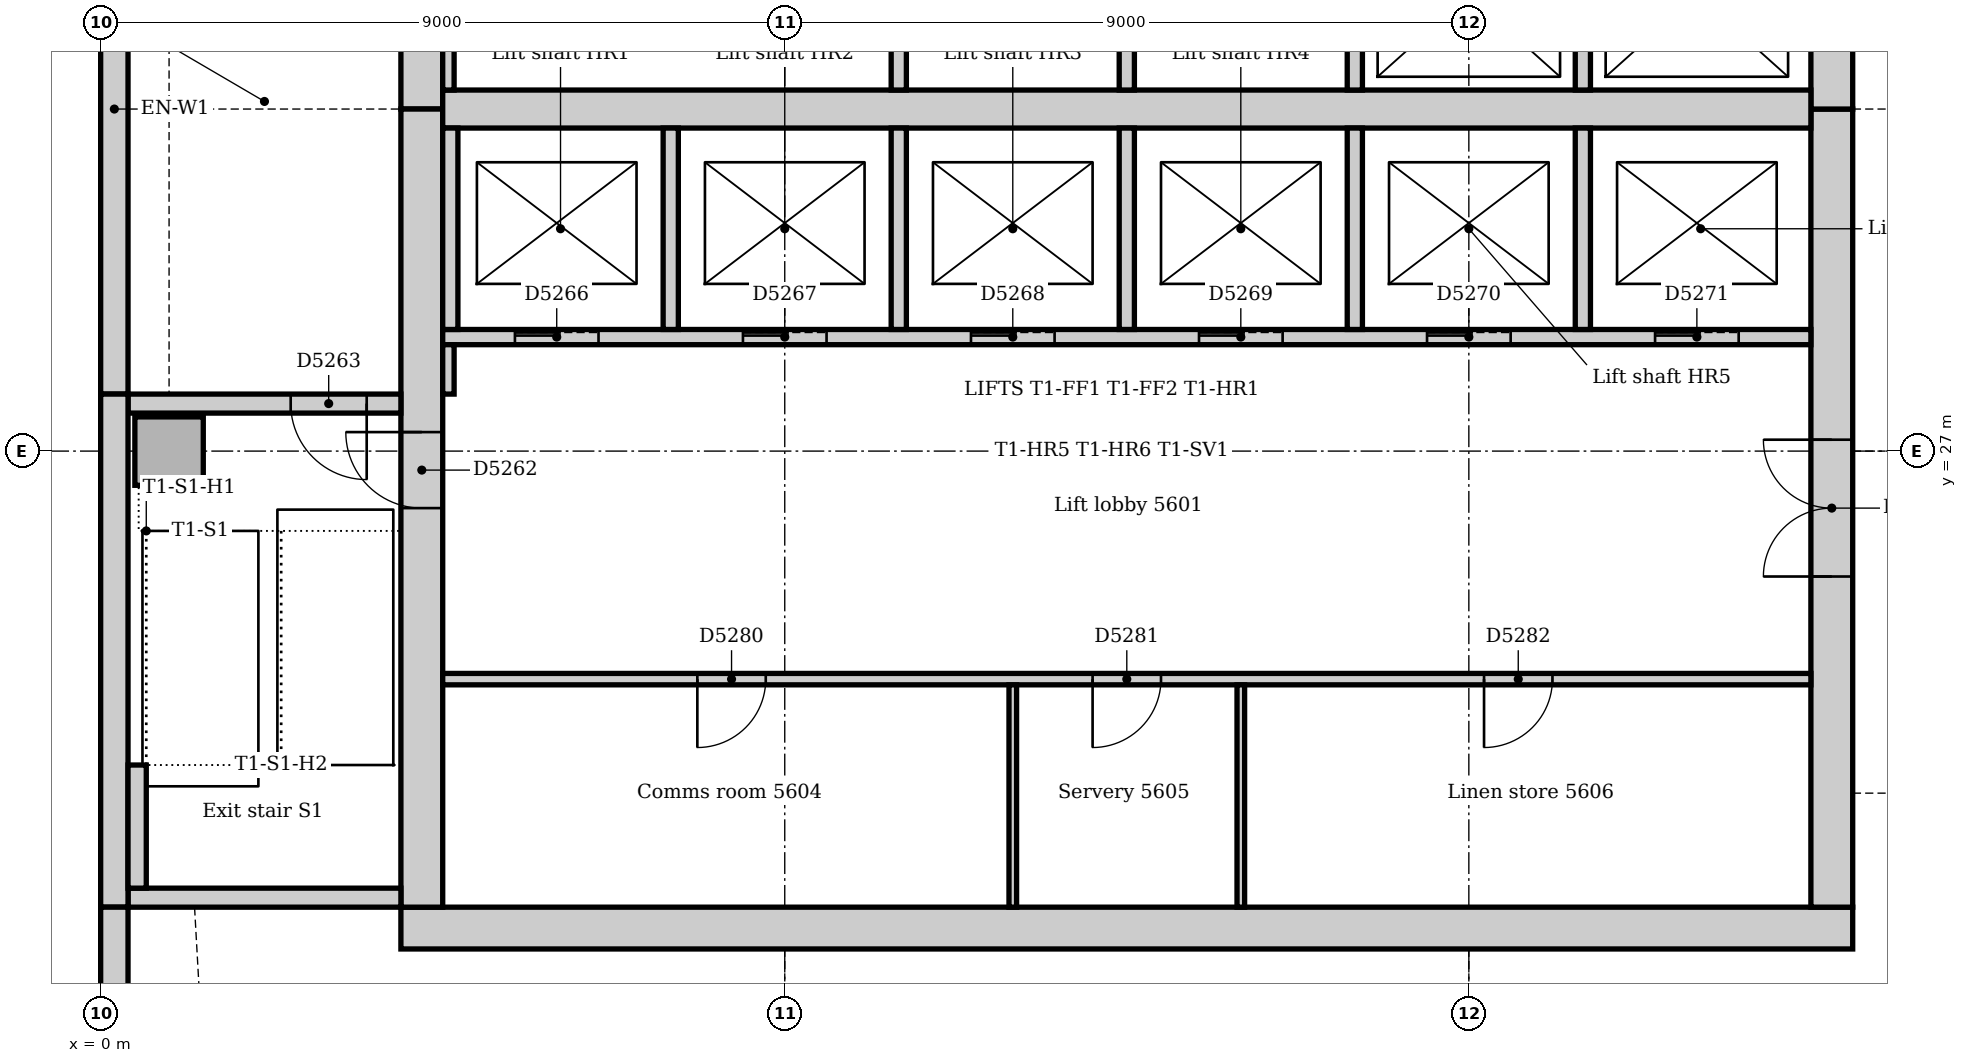
"""IFC4 building model, lengths in metres.
Left out: names, types, materials, properties, quantities, classifications, styles, units other than length and angle.
Written with IfcOpenShell. Run it as: python <this file> out.ifc"""

import sys

from ifc_helpers import new_model, si_unit, direction, frame, frame_2d, origin, origin_2d, place, context, subcontext, project, spatial, rectangle, extrude, element, fill, save


model = new_model("IFC4")
c1 = context("Model", 3, precision=1e-05, world=origin(), true_north=direction((0.0, 1.0)))
c2 = subcontext(c1, "Body", "Model", "MODEL_VIEW")
j1 = project(units=[si_unit("LENGTHUNIT", "METRE"), si_unit("PLANEANGLEUNIT", "RADIAN")], contexts=[c1])
p1 = place(None, origin())
s1 = spatial("IfcSite", under=j1, at=p1, CompositionType="ELEMENT")
p2 = place(p1, origin())
s2 = spatial("IfcBuilding", under=s1, at=p2, CompositionType="ELEMENT")
p3 = place(p2, frame((0.0, 0.0, 234.0)))
s3 = spatial("IfcBuildingStorey", under=s2, at=p3, CompositionType="ELEMENT", Elevation=234.0)
p4 = place(p3, frame((3.95, 20.725, 0.0), z_axis=(0.0, 0.0, 1.0), x_axis=(1.0, 0.0, 0.0)))
e1 = element("IfcWall", 1, at=p4, inside=s3, PredefinedType="SOLIDWALL", context=c2, shape_type="SweptSolid", body=[
    extrude(rectangle(XDim=19.1, YDim=0.55, at=frame_2d((9.55, 0.0))), origin(), (0.0, 0.0, 1.0), 4.0),
])
p5 = place(p3, frame((22.775, 21.0, 0.0), z_axis=(0.0, 0.0, 1.0), x_axis=(0.0, 1.0, 0.0)))
e2 = element("IfcWall", 2, at=p5, inside=s3, PredefinedType="SOLIDWALL", context=c2, shape_type="SweptSolid", body=[
    extrude(rectangle(XDim=10.5, YDim=0.55, at=frame_2d((5.25, 0.0))), origin(), (0.0, 0.0, 1.0), 4.0),
])
p6 = place(p5, frame((4.35, 0.0, 0.0)))
e3 = element("IfcOpeningElement", 3, at=p6, cuts=e2, PredefinedType="OPENING", context=c2, shape_type="SweptSolid", body=[
    extrude(rectangle(XDim=1.8, YDim=2.1, at=frame_2d((0.9, 1.05))), frame((0.0, 0.285, 0.0), z_axis=(0.0, -1.0, 0.0), x_axis=(1.0, 0.0, 0.0)), (0.0, 0.0, 1.0), 0.57),
])
p7 = place(p3, frame((22.775, 31.5, 0.0), z_axis=(0.0, 0.0, 1.0), x_axis=(0.0, 1.0, 0.0)))
e4 = element("IfcWall", 4, at=p7, inside=s3, PredefinedType="SOLIDWALL", context=c2, shape_type="SweptSolid", body=[
    extrude(rectangle(XDim=10.5, YDim=0.55, at=frame_2d((5.25, 0.0))), origin(), (0.0, 0.0, 1.0), 4.0),
])
p8 = place(p7, frame((3.15, 0.0, 0.0)))
e5 = element("IfcOpeningElement", 5, at=p8, cuts=e4, PredefinedType="OPENING", context=c2, shape_type="SweptSolid", body=[
    extrude(rectangle(XDim=1.0, YDim=2.1, at=frame_2d((0.5, 1.05))), frame((0.0, 0.285, 0.0), z_axis=(0.0, -1.0, 0.0), x_axis=(1.0, 0.0, 0.0)), (0.0, 0.0, 1.0), 0.57),
])
p9 = place(p7, frame((5.2, 0.0, 0.0)))
e6 = element("IfcOpeningElement", 6, at=p9, cuts=e4, PredefinedType="OPENING", context=c2, shape_type="SweptSolid", body=[
    extrude(rectangle(XDim=1.0, YDim=2.1, at=frame_2d((0.5, 1.05))), frame((0.0, 0.285, 0.0), z_axis=(0.0, -1.0, 0.0), x_axis=(1.0, 0.0, 0.0)), (0.0, 0.0, 1.0), 0.57),
])
p10 = place(p3, frame((4.225, 42.0, 0.0), z_axis=(0.0, 0.0, 1.0), x_axis=(0.0, -1.0, 0.0)))
e7 = element("IfcWall", 7, at=p10, inside=s3, PredefinedType="SOLIDWALL", context=c2, shape_type="SweptSolid", body=[
    extrude(rectangle(XDim=10.5, YDim=0.55, at=frame_2d((5.25, 0.0))), origin(), (0.0, 0.0, 1.0), 4.0),
])
p11 = place(p10, frame((5.3, 0.0, 0.0)))
e8 = element("IfcOpeningElement", 8, at=p11, cuts=e7, PredefinedType="OPENING", context=c2, shape_type="SweptSolid", body=[
    extrude(rectangle(XDim=1.0, YDim=2.1, at=frame_2d((0.5, 1.05))), frame((0.0, 0.285, 0.0), z_axis=(0.0, -1.0, 0.0), x_axis=(1.0, 0.0, 0.0)), (0.0, 0.0, 1.0), 0.57),
])
p12 = place(p3, frame((4.225, 31.5, 0.0), z_axis=(0.0, 0.0, 1.0), x_axis=(0.0, -1.0, 0.0)))
e9 = element("IfcWall", 9, at=p12, inside=s3, PredefinedType="SOLIDWALL", context=c2, shape_type="SweptSolid", body=[
    extrude(rectangle(XDim=10.5, YDim=0.55, at=frame_2d((5.25, 0.0))), origin(), (0.0, 0.0, 1.0), 4.0),
])
p13 = place(p12, frame((4.25, 0.0, 0.0)))
e10 = element("IfcOpeningElement", 10, at=p13, cuts=e9, PredefinedType="OPENING", context=c2, shape_type="SweptSolid", body=[
    extrude(rectangle(XDim=1.0, YDim=2.1, at=frame_2d((0.5, 1.05))), frame((0.0, 0.285, 0.0), z_axis=(0.0, -1.0, 0.0), x_axis=(1.0, 0.0, 0.0)), (0.0, 0.0, 1.0), 0.57),
])
p14 = place(p3, frame((4.5, 31.5, 0.0), z_axis=(0.0, 0.0, 1.0), x_axis=(1.0, 0.0, 0.0)))
e11 = element("IfcWall", 11, at=p14, inside=s3, PredefinedType="SOLIDWALL", context=c2, shape_type="SweptSolid", body=[
    extrude(rectangle(XDim=18.0, YDim=0.5, at=frame_2d((9.0, 0.0))), origin(), (0.0, 0.0, 1.0), 4.0),
])
p15 = place(p3, frame((0.36, 21.125, 0.0), z_axis=(0.0, 0.0, 1.0), x_axis=(1.0, 0.0, 0.0)))
e12 = element("IfcWall", 12, at=p15, inside=s3, PredefinedType="SOLIDWALL", context=c2, shape_type="SweptSolid", body=[
    extrude(rectangle(XDim=3.59, YDim=0.25, at=frame_2d((1.795, 0.0))), origin(), (0.0, 0.0, 1.0), 4.0),
])
p16 = place(p3, frame((3.95, 27.625, 0.0), z_axis=(0.0, 0.0, 1.0), x_axis=(-1.0, 0.0, 0.0)))
e13 = element("IfcWall", 13, at=p16, inside=s3, PredefinedType="SOLIDWALL", context=c2, shape_type="SweptSolid", body=[
    extrude(rectangle(XDim=3.59, YDim=0.25, at=frame_2d((1.795, 0.0))), origin(), (0.0, 0.0, 1.0), 4.0),
])
p17 = place(p16, frame((0.45, 0.0, 0.0)))
e14 = element("IfcOpeningElement", 14, at=p17, cuts=e13, PredefinedType="OPENING", context=c2, shape_type="SweptSolid", body=[
    extrude(rectangle(XDim=1.0, YDim=2.1, at=frame_2d((0.5, 1.05))), frame((0.0, 0.135, 0.0), z_axis=(0.0, -1.0, 0.0), x_axis=(1.0, 0.0, 0.0)), (0.0, 0.0, 1.0), 0.27),
])
p18 = place(p3, frame((0.9, 27.0, 0.0), z_axis=(0.0, 0.0, 1.0), x_axis=(1.0, 0.0, 0.0)))
e15 = element("IfcColumn", 15, at=p18, inside=s3, PredefinedType="COLUMN", context=c2, shape_type="SweptSolid", body=[
    extrude(rectangle(XDim=0.9, YDim=0.9, at=origin_2d()), origin(), (0.0, 0.0, 1.0), 4.0),
])
p19 = place(p3, frame((0.18, 35.25, 0.0), z_axis=(0.0, 0.0, 1.0), x_axis=(0.0, -1.0, 0.0)))
e16 = element("IfcWall", 16, at=p19, inside=s3, PredefinedType="STANDARD", context=c2, shape_type="SweptSolid", body=[
    extrude(rectangle(XDim=7.5, YDim=0.36, at=frame_2d((3.75, 0.0))), origin(), (0.0, 0.0, 1.0), 3.85),
])
p20 = place(p3, frame((0.18, 27.75, 0.0), z_axis=(0.0, 0.0, 1.0), x_axis=(0.0, -1.0, 0.0)))
e17 = element("IfcWall", 17, at=p20, inside=s3, PredefinedType="STANDARD", context=c2, shape_type="SweptSolid", body=[
    extrude(rectangle(XDim=6.75, YDim=0.36, at=frame_2d((3.375, 0.0))), origin(), (0.0, 0.0, 1.0), 3.85),
])
p21 = place(p3, frame((0.18, 21.0, 0.0), z_axis=(0.0, 0.0, 1.0), x_axis=(0.0, -1.0, 0.0)))
e18 = element("IfcWall", 18, at=p21, inside=s3, PredefinedType="STANDARD", context=c2, shape_type="SweptSolid", body=[
    extrude(rectangle(XDim=3.257, YDim=0.36, at=frame_2d((1.629, 0.0))), origin(), (0.0, 0.0, 1.0), 3.85),
])
p22 = place(p3, frame((0.48, 21.25, 0.0), z_axis=(0.0, 0.0, 1.0), x_axis=(0.0, 1.0, 0.0)))
e19 = element("IfcWall", 19, at=p22, inside=s3, PredefinedType="STANDARD", context=c2, shape_type="SweptSolid", body=[
    extrude(rectangle(XDim=1.62, YDim=0.24, at=frame_2d((0.81, 0.0))), origin(), (0.0, 0.0, 1.0), 4.0),
])
p23 = place(p3, frame((4.5, 28.5, 0.0), z_axis=(0.0, 0.0, 1.0), x_axis=(1.0, 0.0, 0.0)))
e20 = element("IfcWall", 20, at=p23, inside=s3, PredefinedType="PARTITIONING", context=c2, shape_type="SweptSolid", body=[
    extrude(rectangle(XDim=18.0, YDim=0.2, at=frame_2d((9.0, 0.0))), origin(), (0.0, 0.0, 1.0), 3.85),
])
p24 = place(p23, frame((0.95, 0.0, 0.0)))
e21 = element("IfcOpeningElement", 21, at=p24, cuts=e20, PredefinedType="OPENING", context=c2, shape_type="SweptSolid", body=[
    extrude(rectangle(XDim=1.1, YDim=2.1, at=frame_2d((0.55, 1.05))), frame((0.0, 0.11, 0.0), z_axis=(0.0, -1.0, 0.0), x_axis=(1.0, 0.0, 0.0)), (0.0, 0.0, 1.0), 0.22),
])
p25 = place(p23, frame((3.95, 0.0, 0.0)))
e22 = element("IfcOpeningElement", 22, at=p25, cuts=e20, PredefinedType="OPENING", context=c2, shape_type="SweptSolid", body=[
    extrude(rectangle(XDim=1.1, YDim=2.1, at=frame_2d((0.55, 1.05))), frame((0.0, 0.11, 0.0), z_axis=(0.0, -1.0, 0.0), x_axis=(1.0, 0.0, 0.0)), (0.0, 0.0, 1.0), 0.22),
])
p26 = place(p23, frame((6.95, 0.0, 0.0)))
e23 = element("IfcOpeningElement", 23, at=p26, cuts=e20, PredefinedType="OPENING", context=c2, shape_type="SweptSolid", body=[
    extrude(rectangle(XDim=1.1, YDim=2.1, at=frame_2d((0.55, 1.05))), frame((0.0, 0.11, 0.0), z_axis=(0.0, -1.0, 0.0), x_axis=(1.0, 0.0, 0.0)), (0.0, 0.0, 1.0), 0.22),
])
p27 = place(p23, frame((9.95, 0.0, 0.0)))
e24 = element("IfcOpeningElement", 24, at=p27, cuts=e20, PredefinedType="OPENING", context=c2, shape_type="SweptSolid", body=[
    extrude(rectangle(XDim=1.1, YDim=2.1, at=frame_2d((0.55, 1.05))), frame((0.0, 0.11, 0.0), z_axis=(0.0, -1.0, 0.0), x_axis=(1.0, 0.0, 0.0)), (0.0, 0.0, 1.0), 0.22),
])
p28 = place(p23, frame((12.95, 0.0, 0.0)))
e25 = element("IfcOpeningElement", 25, at=p28, cuts=e20, PredefinedType="OPENING", context=c2, shape_type="SweptSolid", body=[
    extrude(rectangle(XDim=1.1, YDim=2.1, at=frame_2d((0.55, 1.05))), frame((0.0, 0.11, 0.0), z_axis=(0.0, -1.0, 0.0), x_axis=(1.0, 0.0, 0.0)), (0.0, 0.0, 1.0), 0.22),
])
p29 = place(p23, frame((15.95, 0.0, 0.0)))
e26 = element("IfcOpeningElement", 26, at=p29, cuts=e20, PredefinedType="OPENING", context=c2, shape_type="SweptSolid", body=[
    extrude(rectangle(XDim=1.1, YDim=2.1, at=frame_2d((0.55, 1.05))), frame((0.0, 0.11, 0.0), z_axis=(0.0, -1.0, 0.0), x_axis=(1.0, 0.0, 0.0)), (0.0, 0.0, 1.0), 0.22),
])
for number, where, z_axis, x_axis in (
    (27, (10.5, 28.6, 0.0), (0.0, 0.0, 1.0), (0.0, 1.0, 0.0)),
    (28, (10.5, 31.75, 0.0), (0.0, 0.0, 1.0), (0.0, 1.0, 0.0)),
    (29, (13.5, 28.6, 0.0), (0.0, 0.0, 1.0), (0.0, 1.0, 0.0)),
    (30, (13.5, 31.75, 0.0), (0.0, 0.0, 1.0), (0.0, 1.0, 0.0)),
    (31, (16.5, 28.6, 0.0), (0.0, 0.0, 1.0), (0.0, 1.0, 0.0)),
    (32, (16.5, 31.75, 0.0), (0.0, 0.0, 1.0), (0.0, 1.0, 0.0)),
    (33, (19.5, 28.6, 0.0), (0.0, 0.0, 1.0), (0.0, 1.0, 0.0)),
    (34, (19.5, 31.75, 0.0), (0.0, 0.0, 1.0), (0.0, 1.0, 0.0)),
    (35, (4.6, 28.6, 0.0), (0.0, 0.0, 1.0), (0.0, 1.0, 0.0)),
    (36, (7.5, 28.6, 0.0), (0.0, 0.0, 1.0), (0.0, 1.0, 0.0)),
):
    element("IfcWall", number, at=place(p3, frame(where, z_axis=z_axis, x_axis=x_axis)), inside=s3, PredefinedType="PARTITIONING", context=c2, shape_type="SweptSolid", body=[
        extrude(rectangle(XDim=2.65, YDim=0.2, at=frame_2d((1.325, 0.0))), origin(), (0.0, 0.0, 1.0), 3.85),
    ])
p30 = place(p3, frame((4.5, 24.0, 0.0), z_axis=(0.0, 0.0, 1.0), x_axis=(1.0, 0.0, 0.0)))
e37 = element("IfcWall", 37, at=p30, inside=s3, PredefinedType="PARTITIONING", context=c2, shape_type="SweptSolid", body=[
    extrude(rectangle(XDim=18.0, YDim=0.15, at=frame_2d((9.0, 0.0))), origin(), (0.0, 0.0, 1.0), 3.85),
])
p31 = place(p30, frame((3.35, 0.0, 0.0)))
e38 = element("IfcOpeningElement", 38, at=p31, cuts=e37, PredefinedType="OPENING", context=c2, shape_type="SweptSolid", body=[
    extrude(rectangle(XDim=0.9, YDim=2.1, at=frame_2d((0.45, 1.05))), frame((0.0, 0.085, 0.0), z_axis=(0.0, -1.0, 0.0), x_axis=(1.0, 0.0, 0.0)), (0.0, 0.0, 1.0), 0.17),
])
p32 = place(p30, frame((8.55, 0.0, 0.0)))
e39 = element("IfcOpeningElement", 39, at=p32, cuts=e37, PredefinedType="OPENING", context=c2, shape_type="SweptSolid", body=[
    extrude(rectangle(XDim=0.9, YDim=2.1, at=frame_2d((0.45, 1.05))), frame((0.0, 0.085, 0.0), z_axis=(0.0, -1.0, 0.0), x_axis=(1.0, 0.0, 0.0)), (0.0, 0.0, 1.0), 0.17),
])
p33 = place(p30, frame((13.7, 0.0, 0.0)))
e40 = element("IfcOpeningElement", 40, at=p33, cuts=e37, PredefinedType="OPENING", context=c2, shape_type="SweptSolid", body=[
    extrude(rectangle(XDim=0.9, YDim=2.1, at=frame_2d((0.45, 1.05))), frame((0.0, 0.085, 0.0), z_axis=(0.0, -1.0, 0.0), x_axis=(1.0, 0.0, 0.0)), (0.0, 0.0, 1.0), 0.17),
])
p34 = place(p3, frame((4.575, 31.75, 0.0), z_axis=(0.0, 0.0, 1.0), x_axis=(0.0, 1.0, 0.0)))
e41 = element("IfcWall", 41, at=p34, inside=s3, PredefinedType="PARTITIONING", context=c2, shape_type="SweptSolid", body=[
    extrude(rectangle(XDim=2.675, YDim=0.15, at=frame_2d((1.337, 0.0))), origin(), (0.0, 0.0, 1.0), 3.85),
])
p35 = place(p3, frame((4.575, 27.75, 0.0), z_axis=(0.0, 0.0, 1.0), x_axis=(0.0, 1.0, 0.0)))
e42 = element("IfcWall", 42, at=p35, inside=s3, PredefinedType="PARTITIONING", context=c2, shape_type="SweptSolid", body=[
    extrude(rectangle(XDim=0.65, YDim=0.15, at=frame_2d((0.325, 0.0))), origin(), (0.0, 0.0, 1.0), 3.85),
])
for number, where, z_axis, x_axis in (
    (43, (12.0, 21.0, 0.0), (0.0, 0.0, 1.0), (0.0, 1.0, 0.0)),
    (44, (15.0, 21.0, 0.0), (0.0, 0.0, 1.0), (0.0, 1.0, 0.0)),
):
    element("IfcWall", number, at=place(p3, frame(where, z_axis=z_axis, x_axis=x_axis)), inside=s3, PredefinedType="PARTITIONING", context=c2, shape_type="SweptSolid", body=[
        extrude(rectangle(XDim=2.925, YDim=0.1, at=frame_2d((1.462, 0.0))), origin(), (0.0, 0.0, 1.0), 3.85),
    ])
p36 = place(p13, frame((1.0, 0.0, 0.0), z_axis=(0.0, 0.0, 1.0), x_axis=(-1.0, 0.0, 0.0)))
e45 = element("IfcDoor", 45, at=p36, inside=s3, OperationType="SINGLE_SWING_RIGHT", PredefinedType="DOOR", context=c2, shape_type="SweptSolid", body=[
    extrude(rectangle(XDim=1.0, YDim=2.1, at=frame_2d((0.5, 1.05))), frame((0.0, 0.025, 0.0), z_axis=(0.0, -1.0, 0.0), x_axis=(1.0, 0.0, 0.0)), (0.0, 0.0, 1.0), 0.05),
])
fill(e10, e45)
p37 = place(p17, origin())
e46 = element("IfcDoor", 46, at=p37, inside=s3, OperationType="SINGLE_SWING_LEFT", PredefinedType="DOOR", context=c2, shape_type="SweptSolid", body=[
    extrude(rectangle(XDim=1.0, YDim=2.1, at=frame_2d((0.5, 1.05))), frame((0.0, 0.025, 0.0), z_axis=(0.0, -1.0, 0.0), x_axis=(1.0, 0.0, 0.0)), (0.0, 0.0, 1.0), 0.05),
])
fill(e14, e46)
p38 = place(p24, origin())
e47 = element("IfcDoor", 47, at=p38, inside=s3, OperationType="SLIDING_TO_LEFT", PredefinedType="DOOR", context=c2, shape_type="SweptSolid", body=[
    extrude(rectangle(XDim=1.1, YDim=2.1, at=frame_2d((0.55, 1.05))), frame((0.0, 0.025, 0.0), z_axis=(0.0, -1.0, 0.0), x_axis=(1.0, 0.0, 0.0)), (0.0, 0.0, 1.0), 0.05),
])
fill(e21, e47)
p39 = place(p25, origin())
e48 = element("IfcDoor", 48, at=p39, inside=s3, OperationType="SLIDING_TO_LEFT", PredefinedType="DOOR", context=c2, shape_type="SweptSolid", body=[
    extrude(rectangle(XDim=1.1, YDim=2.1, at=frame_2d((0.55, 1.05))), frame((0.0, 0.025, 0.0), z_axis=(0.0, -1.0, 0.0), x_axis=(1.0, 0.0, 0.0)), (0.0, 0.0, 1.0), 0.05),
])
fill(e22, e48)
p40 = place(p26, origin())
e49 = element("IfcDoor", 49, at=p40, inside=s3, OperationType="SLIDING_TO_LEFT", PredefinedType="DOOR", context=c2, shape_type="SweptSolid", body=[
    extrude(rectangle(XDim=1.1, YDim=2.1, at=frame_2d((0.55, 1.05))), frame((0.0, 0.025, 0.0), z_axis=(0.0, -1.0, 0.0), x_axis=(1.0, 0.0, 0.0)), (0.0, 0.0, 1.0), 0.05),
])
fill(e23, e49)
p41 = place(p27, origin())
e50 = element("IfcDoor", 50, at=p41, inside=s3, OperationType="SLIDING_TO_LEFT", PredefinedType="DOOR", context=c2, shape_type="SweptSolid", body=[
    extrude(rectangle(XDim=1.1, YDim=2.1, at=frame_2d((0.55, 1.05))), frame((0.0, 0.025, 0.0), z_axis=(0.0, -1.0, 0.0), x_axis=(1.0, 0.0, 0.0)), (0.0, 0.0, 1.0), 0.05),
])
fill(e24, e50)
p42 = place(p28, origin())
e51 = element("IfcDoor", 51, at=p42, inside=s3, OperationType="SLIDING_TO_LEFT", PredefinedType="DOOR", context=c2, shape_type="SweptSolid", body=[
    extrude(rectangle(XDim=1.1, YDim=2.1, at=frame_2d((0.55, 1.05))), frame((0.0, 0.025, 0.0), z_axis=(0.0, -1.0, 0.0), x_axis=(1.0, 0.0, 0.0)), (0.0, 0.0, 1.0), 0.05),
])
fill(e25, e51)
p43 = place(p29, origin())
e52 = element("IfcDoor", 52, at=p43, inside=s3, OperationType="SLIDING_TO_LEFT", PredefinedType="DOOR", context=c2, shape_type="SweptSolid", body=[
    extrude(rectangle(XDim=1.1, YDim=2.1, at=frame_2d((0.55, 1.05))), frame((0.0, 0.025, 0.0), z_axis=(0.0, -1.0, 0.0), x_axis=(1.0, 0.0, 0.0)), (0.0, 0.0, 1.0), 0.05),
])
fill(e26, e52)
p44 = place(p6, origin())
e53 = element("IfcDoor", 53, at=p44, inside=s3, OperationType="DOUBLE_DOOR_DOUBLE_SWING", PredefinedType="DOOR", context=c2, shape_type="SweptSolid", body=[
    extrude(rectangle(XDim=1.8, YDim=2.1, at=frame_2d((0.9, 1.05))), frame((0.0, 0.025, 0.0), z_axis=(0.0, -1.0, 0.0), x_axis=(1.0, 0.0, 0.0)), (0.0, 0.0, 1.0), 0.05),
])
fill(e3, e53)
p45 = place(p31, frame((0.9, 0.0, 0.0), z_axis=(0.0, 0.0, 1.0), x_axis=(-1.0, 0.0, 0.0)))
e54 = element("IfcDoor", 54, at=p45, inside=s3, OperationType="SINGLE_SWING_RIGHT", PredefinedType="DOOR", context=c2, shape_type="SweptSolid", body=[
    extrude(rectangle(XDim=0.9, YDim=2.1, at=frame_2d((0.45, 1.05))), frame((0.0, 0.025, 0.0), z_axis=(0.0, -1.0, 0.0), x_axis=(1.0, 0.0, 0.0)), (0.0, 0.0, 1.0), 0.05),
])
fill(e38, e54)
p46 = place(p32, frame((0.9, 0.0, 0.0), z_axis=(0.0, 0.0, 1.0), x_axis=(-1.0, 0.0, 0.0)))
e55 = element("IfcDoor", 55, at=p46, inside=s3, OperationType="SINGLE_SWING_RIGHT", PredefinedType="DOOR", context=c2, shape_type="SweptSolid", body=[
    extrude(rectangle(XDim=0.9, YDim=2.1, at=frame_2d((0.45, 1.05))), frame((0.0, 0.025, 0.0), z_axis=(0.0, -1.0, 0.0), x_axis=(1.0, 0.0, 0.0)), (0.0, 0.0, 1.0), 0.05),
])
fill(e39, e55)
p47 = place(p33, frame((0.9, 0.0, 0.0), z_axis=(0.0, 0.0, 1.0), x_axis=(-1.0, 0.0, 0.0)))
e56 = element("IfcDoor", 56, at=p47, inside=s3, OperationType="SINGLE_SWING_RIGHT", PredefinedType="DOOR", context=c2, shape_type="SweptSolid", body=[
    extrude(rectangle(XDim=0.9, YDim=2.1, at=frame_2d((0.45, 1.05))), frame((0.0, 0.025, 0.0), z_axis=(0.0, -1.0, 0.0), x_axis=(1.0, 0.0, 0.0)), (0.0, 0.0, 1.0), 0.05),
])
fill(e40, e56)
save(model, sys.argv[1])
